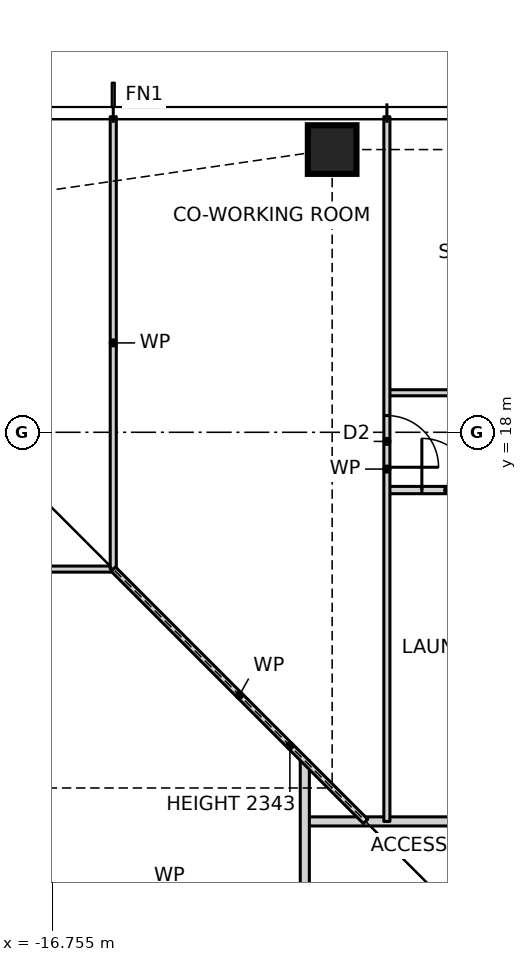
"""IFC4 building model, lengths in metres.
Left out: names, types, materials, properties, quantities, classifications, styles, units other than length and angle.
Written with IfcOpenShell. Run it as: python <this file> out.ifc"""

import sys

from ifc_helpers import new_model, si_unit, direction, frame, frame_2d, origin, origin_2d, place, context, subcontext, project, spatial, rectangle, hollow_rectangle, extrude, element, fill, save


model = new_model("IFC4")
c1 = context("Model", 3, precision=1e-05, world=origin(), true_north=direction((0.0, 1.0)))
c2 = subcontext(c1, "Body", "Model", "MODEL_VIEW")
j1 = project(units=[si_unit("LENGTHUNIT", "METRE"), si_unit("PLANEANGLEUNIT", "RADIAN")], contexts=[c1])
p1 = place(None, origin())
s1 = spatial("IfcSite", under=j1, at=p1, CompositionType="ELEMENT")
p2 = place(p1, origin())
s2 = spatial("IfcBuilding", under=s1, at=p2, CompositionType="ELEMENT")
p3 = place(p2, frame((0.0, 0.0, 53.5)))
s3 = spatial("IfcBuildingStorey", under=s2, at=p3, CompositionType="ELEMENT", Elevation=53.5)
p4 = place(p3, frame((-12.15, 22.65, 0.0), z_axis=(0.0, 0.0, 1.0), x_axis=(1.0, 0.0, 0.0)))
e1 = element("IfcColumn", 1, at=p4, inside=s3, PredefinedType="COLUMN", context=c2, shape_type="SweptSolid", body=[
    extrude(hollow_rectangle(XDim=0.8, YDim=0.8, WallThickness=0.09, at=origin_2d()), origin(), (0.0, 0.0, 1.0), 3.5),
])
p5 = place(p3, frame((-12.6, 11.6, 0.0), z_axis=(0.0, 0.0, 1.0), x_axis=(1.0, 0.0, 0.0)))
e2 = element("IfcWall", 2, at=p5, inside=s3, PredefinedType="PARTITIONING", context=c2, shape_type="SweptSolid", body=[
    extrude(rectangle(XDim=24.2, YDim=0.15, at=frame_2d((12.1, 0.0))), origin(), (0.0, 0.0, 1.0), 3.27),
])
p6 = place(p5, frame((8.95, 0.0, 0.0)))
e3 = element("IfcOpeningElement", 3, at=p6, cuts=e2, PredefinedType="OPENING", context=c2, shape_type="SweptSolid", body=[
    extrude(rectangle(XDim=1.0, YDim=2.1, at=frame_2d((0.5, 1.05))), frame((0.0, 0.085, 0.0), z_axis=(0.0, -1.0, 0.0), x_axis=(1.0, 0.0, 0.0)), (0.0, 0.0, 1.0), 0.17),
])
p7 = place(p5, frame((6.9, 0.0, 0.0)))
e4 = element("IfcOpeningElement", 4, at=p7, cuts=e2, PredefinedType="OPENING", context=c2, shape_type="SweptSolid", body=[
    extrude(rectangle(XDim=0.9, YDim=2.1, at=frame_2d((0.45, 1.05))), frame((0.0, 0.085, 0.0), z_axis=(0.0, -1.0, 0.0), x_axis=(1.0, 0.0, 0.0)), (0.0, 0.0, 1.0), 0.17),
])
p8 = place(p3, frame((-23.19, 15.75, 0.0), z_axis=(0.0, 0.0, 1.0), x_axis=(1.0, 0.0, 0.0)))
e5 = element("IfcWall", 5, at=p8, inside=s3, PredefinedType="PARTITIONING", context=c2, shape_type="SweptSolid", body=[
    extrude(rectangle(XDim=7.44, YDim=0.1, at=frame_2d((3.72, 0.0))), origin(), (0.0, 0.0, 1.0), 3.27),
])
p9 = place(p8, frame((4.915, 0.0, 0.0)))
e6 = element("IfcOpeningElement", 6, at=p9, cuts=e5, PredefinedType="OPENING", context=c2, shape_type="SweptSolid", body=[
    extrude(rectangle(XDim=0.85, YDim=2.1, at=frame_2d((0.425, 1.05))), frame((0.0, 0.06, 0.0), z_axis=(0.0, -1.0, 0.0), x_axis=(1.0, 0.0, 0.0)), (0.0, 0.0, 1.0), 0.12),
])
p10 = place(p3, frame((-11.25, 17.05, 0.0), z_axis=(0.0, 0.0, 1.0), x_axis=(1.0, 0.0, 0.0)))
e7 = element("IfcWall", 7, at=p10, inside=s3, PredefinedType="PARTITIONING", context=c2, shape_type="SweptSolid", body=[
    extrude(rectangle(XDim=6.9, YDim=0.12, at=frame_2d((3.45, 0.0))), origin(), (0.0, 0.0, 1.0), 3.27),
])
p11 = place(p10, frame((3.925, 0.0, 0.0)))
e8 = element("IfcOpeningElement", 8, at=p11, cuts=e7, PredefinedType="OPENING", context=c2, shape_type="SweptSolid", body=[
    extrude(rectangle(XDim=0.85, YDim=2.1, at=frame_2d((0.425, 1.05))), frame((0.0, 0.07, 0.0), z_axis=(0.0, -1.0, 0.0), x_axis=(1.0, 0.0, 0.0)), (0.0, 0.0, 1.0), 0.14),
])
p12 = place(p10, frame((2.375, 0.0, 0.0)))
e9 = element("IfcOpeningElement", 9, at=p12, cuts=e7, PredefinedType="OPENING", context=c2, shape_type="SweptSolid", body=[
    extrude(rectangle(XDim=0.85, YDim=2.1, at=frame_2d((0.425, 1.05))), frame((0.0, 0.07, 0.0), z_axis=(0.0, -1.0, 0.0), x_axis=(1.0, 0.0, 0.0)), (0.0, 0.0, 1.0), 0.14),
])
p13 = place(p10, frame((0.575, 0.0, 0.0)))
e10 = element("IfcOpeningElement", 10, at=p13, cuts=e7, PredefinedType="OPENING", context=c2, shape_type="SweptSolid", body=[
    extrude(rectangle(XDim=0.85, YDim=2.1, at=frame_2d((0.425, 1.05))), frame((0.0, 0.07, 0.0), z_axis=(0.0, -1.0, 0.0), x_axis=(1.0, 0.0, 0.0)), (0.0, 0.0, 1.0), 0.14),
])
p14 = place(p3, frame((-11.25, 18.65, 0.0), z_axis=(0.0, 0.0, 1.0), x_axis=(1.0, 0.0, 0.0)))
e11 = element("IfcWall", 11, at=p14, inside=s3, PredefinedType="PARTITIONING", context=c2, shape_type="SweptSolid", body=[
    extrude(rectangle(XDim=27.0, YDim=0.1, at=frame_2d((13.5, 0.0))), origin(), (0.0, 0.0, 1.0), 3.27),
])
p15 = place(p14, frame((24.3, 0.0, 0.0)))
e12 = element("IfcOpeningElement", 12, at=p15, cuts=e11, PredefinedType="OPENING", context=c2, shape_type="SweptSolid", body=[
    extrude(rectangle(XDim=0.9, YDim=2.1, at=frame_2d((0.45, 1.05))), frame((0.0, 0.06, 0.0), z_axis=(0.0, -1.0, 0.0), x_axis=(1.0, 0.0, 0.0)), (0.0, 0.0, 1.0), 0.12),
])
p16 = place(p14, frame((19.8, 0.0, 0.0)))
e13 = element("IfcOpeningElement", 13, at=p16, cuts=e11, PredefinedType="OPENING", context=c2, shape_type="SweptSolid", body=[
    extrude(rectangle(XDim=0.9, YDim=2.1, at=frame_2d((0.45, 1.05))), frame((0.0, 0.06, 0.0), z_axis=(0.0, -1.0, 0.0), x_axis=(1.0, 0.0, 0.0)), (0.0, 0.0, 1.0), 0.12),
])
p17 = place(p14, frame((15.3, 0.0, 0.0)))
e14 = element("IfcOpeningElement", 14, at=p17, cuts=e11, PredefinedType="OPENING", context=c2, shape_type="SweptSolid", body=[
    extrude(rectangle(XDim=0.9, YDim=2.1, at=frame_2d((0.45, 1.05))), frame((0.0, 0.06, 0.0), z_axis=(0.0, -1.0, 0.0), x_axis=(1.0, 0.0, 0.0)), (0.0, 0.0, 1.0), 0.12),
])
p18 = place(p14, frame((10.8, 0.0, 0.0)))
e15 = element("IfcOpeningElement", 15, at=p18, cuts=e11, PredefinedType="OPENING", context=c2, shape_type="SweptSolid", body=[
    extrude(rectangle(XDim=0.9, YDim=2.1, at=frame_2d((0.45, 1.05))), frame((0.0, 0.06, 0.0), z_axis=(0.0, -1.0, 0.0), x_axis=(1.0, 0.0, 0.0)), (0.0, 0.0, 1.0), 0.12),
])
p19 = place(p14, frame((6.3, 0.0, 0.0)))
e16 = element("IfcOpeningElement", 16, at=p19, cuts=e11, PredefinedType="OPENING", context=c2, shape_type="SweptSolid", body=[
    extrude(rectangle(XDim=0.9, YDim=2.1, at=frame_2d((0.45, 1.05))), frame((0.0, 0.06, 0.0), z_axis=(0.0, -1.0, 0.0), x_axis=(1.0, 0.0, 0.0)), (0.0, 0.0, 1.0), 0.12),
])
p20 = place(p14, frame((1.8, 0.0, 0.0)))
e17 = element("IfcOpeningElement", 17, at=p20, cuts=e11, PredefinedType="OPENING", context=c2, shape_type="SweptSolid", body=[
    extrude(rectangle(XDim=0.9, YDim=2.1, at=frame_2d((0.45, 1.05))), frame((0.0, 0.06, 0.0), z_axis=(0.0, -1.0, 0.0), x_axis=(1.0, 0.0, 0.0)), (0.0, 0.0, 1.0), 0.12),
])
p21 = place(p3, frame((-11.25, 11.6, 0.0), z_axis=(0.0, 0.0, 1.0), x_axis=(0.0, 1.0, 0.0)))
e18 = element("IfcWall", 18, at=p21, inside=s3, PredefinedType="PARTITIONING", context=c2, shape_type="SweptSolid", body=[
    extrude(rectangle(XDim=11.59, YDim=0.1, at=frame_2d((5.795, 0.0))), origin(), (0.0, 0.0, 1.0), 3.27),
])
p22 = place(p21, frame((5.825, 0.0, 0.0)))
e19 = element("IfcOpeningElement", 19, at=p22, cuts=e18, PredefinedType="OPENING", context=c2, shape_type="SweptSolid", body=[
    extrude(rectangle(XDim=0.85, YDim=2.1, at=frame_2d((0.425, 1.05))), frame((0.0, 0.06, 0.0), z_axis=(0.0, -1.0, 0.0), x_axis=(1.0, 0.0, 0.0)), (0.0, 0.0, 1.0), 0.12),
])
p23 = place(p3, frame((-12.6, -12.6, 0.0), z_axis=(0.0, 0.0, 1.0), x_axis=(0.0, 1.0, 0.0)))
e20 = element("IfcWall", 20, at=p23, inside=s3, PredefinedType="PARTITIONING", context=c2, shape_type="SweptSolid", body=[
    extrude(rectangle(XDim=25.2, YDim=0.15, at=frame_2d((12.6, 0.0))), origin(), (0.0, 0.0, 1.0), 3.27),
])
p24 = place(p23, frame((7.15, 0.0, 0.0)))
e21 = element("IfcOpeningElement", 21, at=p24, cuts=e20, PredefinedType="OPENING", context=c2, shape_type="SweptSolid", body=[
    extrude(rectangle(XDim=1.0, YDim=2.1, at=frame_2d((0.5, 1.05))), frame((0.0, 0.085, 0.0), z_axis=(0.0, -1.0, 0.0), x_axis=(1.0, 0.0, 0.0)), (0.0, 0.0, 1.0), 0.17),
])
p25 = place(p3, frame((-15.75, 15.75, 0.0), z_axis=(0.0, 0.0, 1.0), x_axis=(0.0, 1.0, 0.0)))
e22 = element("IfcWall", 22, at=p25, inside=s3, PredefinedType="PARTITIONING", context=c2, shape_type="SweptSolid", body=[
    extrude(rectangle(XDim=7.44, YDim=0.1, at=frame_2d((3.72, 0.0))), origin(), (0.0, 0.0, 1.0), 3.27),
])
p26 = place(p3, frame((-11.6, 11.6, 0.0), z_axis=(0.0, 0.0, 1.0), x_axis=(-0.707106781187, 0.707106781187, 0.0)))
e23 = element("IfcWall", 23, at=p26, inside=s3, PredefinedType="PARTITIONING", context=c2, shape_type="SweptSolid", body=[
    extrude(rectangle(XDim=5.869, YDim=0.1, at=frame_2d((2.935, 0.0))), origin(), (0.0, 0.0, 1.0), 2.343),
])
p27 = place(p13, origin())
e24 = element("IfcDoor", 24, at=p27, inside=s3, OperationType="SINGLE_SWING_LEFT", PredefinedType="DOOR", context=c2, shape_type="SweptSolid", body=[
    extrude(rectangle(XDim=0.85, YDim=2.1, at=frame_2d((0.425, 1.05))), frame((0.0, 0.025, 0.0), z_axis=(0.0, -1.0, 0.0), x_axis=(1.0, 0.0, 0.0)), (0.0, 0.0, 1.0), 0.05),
])
fill(e10, e24)
p28 = place(p22, frame((0.85, 0.0, 0.0), z_axis=(0.0, 0.0, 1.0), x_axis=(-1.0, 0.0, 0.0)))
e25 = element("IfcDoor", 25, at=p28, inside=s3, OperationType="SINGLE_SWING_RIGHT", PredefinedType="DOOR", context=c2, shape_type="SweptSolid", body=[
    extrude(rectangle(XDim=0.85, YDim=2.1, at=frame_2d((0.425, 1.05))), frame((0.0, 0.025, 0.0), z_axis=(0.0, -1.0, 0.0), x_axis=(1.0, 0.0, 0.0)), (0.0, 0.0, 1.0), 0.05),
])
fill(e19, e25)
save(model, sys.argv[1])
